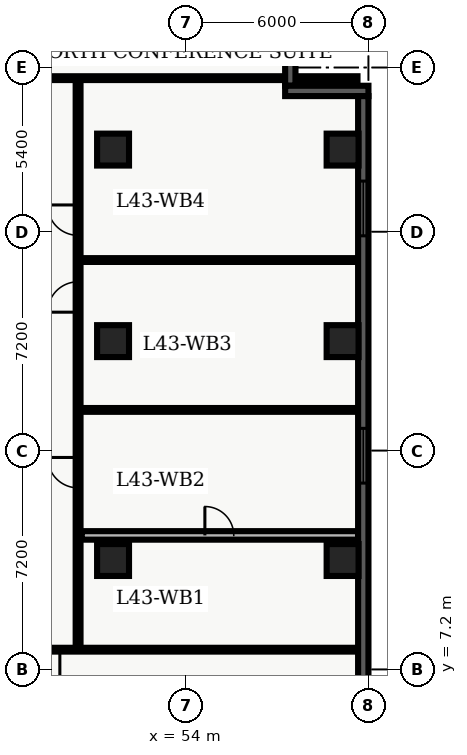
"""IFC4 building model, lengths in metres.
Left out: names, types, materials, properties, quantities, classifications, styles, units other than length and angle.
Written with IfcOpenShell. Run it as: python <this file> out.ifc"""

import sys

from ifc_helpers import new_model, entity, si_unit, converted_unit, direction, frame, origin_with_axes, origin_2d_with_axis, place, context, subcontext, project, spatial, polyline, rectangle, outline, extrude, element, fill, save


model = new_model("IFC4")
c1 = context("Model", 3, precision=1e-05, world=origin_with_axes(), true_north=direction((0.0, 1.0)))
c2 = subcontext(c1, "Body", "Model", "MODEL_VIEW")
j1 = project(units=[si_unit("LENGTHUNIT", "METRE"), converted_unit("PLANEANGLEUNIT", "DEGREE", entity("IfcPlaneAngleMeasure", 0.017), si_unit("PLANEANGLEUNIT", "RADIAN"), dimensions=[0, 0, 0, 0, 0, 0, 0])], contexts=[c1])
p1 = place(None, origin_with_axes())
s1 = spatial("IfcSite", under=j1, at=p1, CompositionType="ELEMENT")
p2 = place(p1, origin_with_axes())
s2 = spatial("IfcBuilding", under=s1, at=p2, CompositionType="ELEMENT")
p3 = place(p2, frame((0.0, 0.0, 175.8), z_axis=(0.0, 0.0, 1.0), x_axis=(1.0, 0.0, 0.0)))
s3 = spatial("IfcBuildingStorey", under=s2, at=p3, CompositionType="ELEMENT", Elevation=175.8)
for number, where, z_axis, x_axis in (
    (1, (51.6, 10.8, 0.0), (0.0, 0.0, 1.0), (1.0, 0.0, 0.0)),
    (2, (51.6, 18.0, 0.0), (0.0, 0.0, 1.0), (1.0, 0.0, 0.0)),
    (3, (51.6, 24.3, 0.0), (0.0, 0.0, 1.0), (1.0, 0.0, 0.0)),
    (4, (59.15, 10.8, 0.0), (0.0, 0.0, 1.0), (1.0, 0.0, 0.0)),
    (5, (59.15, 18.0, 0.0), (0.0, 0.0, 1.0), (1.0, 0.0, 0.0)),
    (6, (59.15, 24.3, 0.0), (0.0, 0.0, 1.0), (1.0, 0.0, 0.0)),
):
    element("IfcColumn", number, at=place(p3, frame(where, z_axis=z_axis, x_axis=x_axis)), inside=s3, PredefinedType="COLUMN", context=c2, shape_type="SweptSolid", body=[
        extrude(rectangle(XDim=1.05, YDim=1.05, at=origin_2d_with_axis()), origin_with_axes(), (0.0, 0.0, 1.0), 3.9),
    ])
p4 = place(p3, frame((50.45, 7.85, 0.0), z_axis=(0.0, 0.0, 1.0), x_axis=(0.0, 1.0, 0.0)))
e7 = element("IfcWall", 7, at=p4, inside=s3, PredefinedType="PARTITIONING", context=c2, shape_type="SweptSolid", body=[
    extrude(outline(polyline([(0.0, -0.08), (18.8, -0.08), (18.8, 0.08), (0.0, 0.08), (0.0, -0.08)])), origin_with_axes(), (0.0, 0.0, 1.0), 2.7),
])
p5 = place(p4, frame((5.823, 0.0, 0.0), z_axis=(0.0, 0.0, 1.0), x_axis=(1.0, 0.0, 0.0)))
e8 = element("IfcOpeningElement", 8, at=p5, cuts=e7, PredefinedType="OPENING", context=c2, shape_type="SweptSolid", body=[
    extrude(rectangle(XDim=1.0, YDim=0.18, at=origin_2d_with_axis()), origin_with_axes(), (0.0, 0.0, 1.0), 2.15),
])
p6 = place(p4, frame((11.602, 0.0, 0.0), z_axis=(0.0, 0.0, 1.0), x_axis=(1.0, 0.0, 0.0)))
e9 = element("IfcOpeningElement", 9, at=p6, cuts=e7, PredefinedType="OPENING", context=c2, shape_type="SweptSolid", body=[
    extrude(rectangle(XDim=1.0, YDim=0.18, at=origin_2d_with_axis()), origin_with_axes(), (0.0, 0.0, 1.0), 2.15),
])
p7 = place(p4, frame((14.129, 0.0, 0.0), z_axis=(0.0, 0.0, 1.0), x_axis=(1.0, 0.0, 0.0)))
e10 = element("IfcOpeningElement", 10, at=p7, cuts=e7, PredefinedType="OPENING", context=c2, shape_type="SweptSolid", body=[
    extrude(rectangle(XDim=1.0, YDim=0.18, at=origin_2d_with_axis()), origin_with_axes(), (0.0, 0.0, 1.0), 2.15),
])
p8 = place(p3, frame((59.665, 7.85, 0.0), z_axis=(0.0, 0.0, 1.0), x_axis=(-1.0, 0.0, 0.0)))
e11 = element("IfcWall", 11, at=p8, inside=s3, PredefinedType="PARTITIONING", context=c2, shape_type="SweptSolid", body=[
    extrude(outline(polyline([(0.0, -0.062), (11.615, -0.062), (11.615, 0.062), (0.0, 0.062), (0.0, -0.062)])), origin_with_axes(), (0.0, 0.0, 1.0), 2.7),
])
p9 = place(p8, frame((10.315, 0.0, 0.0), z_axis=(0.0, 0.0, 1.0), x_axis=(1.0, 0.0, 0.0)))
e12 = element("IfcOpeningElement", 12, at=p9, cuts=e11, PredefinedType="OPENING", context=c2, shape_type="SweptSolid", body=[
    extrude(rectangle(XDim=1.0, YDim=0.145, at=origin_2d_with_axis()), origin_with_axes(), (0.0, 0.0, 1.0), 2.15),
])
p10 = place(p3, frame((38.735, 26.65, 0.0), z_axis=(0.0, 0.0, 1.0), x_axis=(1.0, 0.0, 0.0)))
e13 = element("IfcWall", 13, at=p10, inside=s3, PredefinedType="PARTITIONING", context=c2, shape_type="SweptSolid", body=[
    extrude(outline(polyline([(0.0, -0.062), (20.905, -0.062), (20.905, 0.062), (0.0, 0.062), (0.0, -0.062)])), origin_with_axes(), (0.0, 0.0, 1.0), 2.7),
])
p11 = place(p10, frame((4.265, 0.0, 0.0), z_axis=(0.0, 0.0, 1.0), x_axis=(1.0, 0.0, 0.0)))
e14 = element("IfcOpeningElement", 14, at=p11, cuts=e13, PredefinedType="OPENING", context=c2, shape_type="SweptSolid", body=[
    extrude(rectangle(XDim=1.0, YDim=0.145, at=origin_2d_with_axis()), origin_with_axes(), (0.0, 0.0, 1.0), 2.15),
])
p12 = place(p3, frame((50.57, 11.609, 0.0), z_axis=(0.0, 0.0, 1.0), x_axis=(1.0, 0.0, 0.0)))
e15 = element("IfcWall", 15, at=p12, inside=s3, PredefinedType="PARTITIONING", context=c2, shape_type="SweptSolid", body=[
    extrude(outline(polyline([(0.0, -0.14), (9.095, -0.14), (9.095, 0.14), (0.0, 0.14), (0.0, -0.14)])), origin_with_axes(), (0.0, 0.0, 1.0), 2.7),
])
p13 = place(p12, frame((4.525, 0.0, 0.0), z_axis=(0.0, 0.0, 1.0), x_axis=(1.0, 0.0, 0.0)))
e16 = element("IfcOpeningElement", 16, at=p13, cuts=e15, PredefinedType="OPENING", context=c2, shape_type="SweptSolid", body=[
    extrude(rectangle(XDim=0.95, YDim=0.3, at=origin_2d_with_axis()), origin_with_axes(), (0.0, 0.0, 1.0), 2.15),
])
for number, where, z_axis, x_axis in (
    (17, (50.57, 15.737, 0.0), (0.0, 0.0, 1.0), (1.0, 0.0, 0.0)),
    (18, (50.57, 20.667, 0.0), (0.0, 0.0, 1.0), (1.0, 0.0, 0.0)),
):
    element("IfcWall", number, at=place(p3, frame(where, z_axis=z_axis, x_axis=x_axis)), inside=s3, PredefinedType="PARTITIONING", context=c2, shape_type="SweptSolid", body=[
        extrude(outline(polyline([(0.0, -0.062), (9.095, -0.062), (9.095, 0.062), (0.0, 0.062), (0.0, -0.062)])), origin_with_axes(), (0.0, 0.0, 1.0), 2.7),
    ])
p14 = place(p3, frame((57.43, 28.46, 0.0), z_axis=(0.0, 0.0, 1.0), x_axis=(0.0, -1.0, 0.0)))
e19 = element("IfcWall", 19, at=p14, inside=s3, PredefinedType="SOLIDWALL", context=c2, shape_type="SweptSolid", body=[
    extrude(outline(polyline([(0.0, -0.17), (2.06, -0.17), (2.06, 0.17), (0.0, 0.17), (0.0, -0.17)])), origin_with_axes(), (0.0, 0.0, 1.0), 3.66),
])
p15 = place(p3, frame((57.26, 26.23, 0.0), z_axis=(0.0, 0.0, 1.0), x_axis=(1.0, 0.0, 0.0)))
e20 = element("IfcWall", 20, at=p15, inside=s3, PredefinedType="SOLIDWALL", context=c2, shape_type="SweptSolid", body=[
    extrude(outline(polyline([(0.0, -0.17), (2.74, -0.17), (2.74, 0.17), (0.0, 0.17), (0.0, -0.17)])), origin_with_axes(), (0.0, 0.0, 1.0), 3.66),
])
p16 = place(p3, frame((59.83, 26.06, 0.0), z_axis=(0.0, 0.0, 1.0), x_axis=(0.0, -1.0, 0.0)))
e21 = element("IfcWall", 21, at=p16, inside=s3, PredefinedType="SOLIDWALL", context=c2, shape_type="SweptSolid", body=[
    extrude(outline(polyline([(0.0, -0.17), (23.66, -0.17), (23.66, 0.17), (0.0, 0.17), (0.0, -0.17)])), origin_with_axes(), (0.0, 0.0, 1.0), 3.66),
])
p17 = place(p16, frame((3.696, 0.0, 0.45), z_axis=(0.0, 0.0, 1.0), x_axis=(1.0, 0.0, 0.0)))
e22 = element("IfcOpeningElement", 22, at=p17, cuts=e21, PredefinedType="OPENING", context=c2, shape_type="SweptSolid", body=[
    extrude(rectangle(XDim=1.8, YDim=0.36, at=origin_2d_with_axis()), origin_with_axes(), (0.0, 0.0, 1.0), 2.1),
])
p18 = place(p16, frame((11.83, 0.0, 0.45), z_axis=(0.0, 0.0, 1.0), x_axis=(1.0, 0.0, 0.0)))
e23 = element("IfcOpeningElement", 23, at=p18, cuts=e21, PredefinedType="OPENING", context=c2, shape_type="SweptSolid", body=[
    extrude(rectangle(XDim=1.8, YDim=0.36, at=origin_2d_with_axis()), origin_with_axes(), (0.0, 0.0, 1.0), 2.1),
])
p19 = place(p16, frame((20.364, 0.0, 0.45), z_axis=(0.0, 0.0, 1.0), x_axis=(1.0, 0.0, 0.0)))
e24 = element("IfcOpeningElement", 24, at=p19, cuts=e21, PredefinedType="OPENING", context=c2, shape_type="SweptSolid", body=[
    extrude(rectangle(XDim=1.8, YDim=0.36, at=origin_2d_with_axis()), origin_with_axes(), (0.0, 0.0, 1.0), 2.1),
])
p20 = place(p8, frame((10.315, 0.0, 0.0), z_axis=(0.0, 0.0, 1.0), x_axis=(1.0, 0.0, 0.0)))
e25 = element("IfcDoor", 25, at=p20, inside=s3, OperationType="SINGLE_SWING_LEFT", PredefinedType="DOOR", context=c2, shape_type="SweptSolid", body=[
    extrude(rectangle(XDim=1.0, YDim=0.075, at=origin_2d_with_axis()), origin_with_axes(), (0.0, 0.0, 1.0), 2.15),
])
fill(e12, e25)
p21 = place(p12, frame((4.525, 0.0, 0.0), z_axis=(0.0, 0.0, 1.0), x_axis=(1.0, 0.0, 0.0)))
e26 = element("IfcDoor", 26, at=p21, inside=s3, OperationType="SINGLE_SWING_LEFT", PredefinedType="DOOR", context=c2, shape_type="SweptSolid", body=[
    extrude(rectangle(XDim=0.95, YDim=0.09, at=origin_2d_with_axis()), origin_with_axes(), (0.0, 0.0, 1.0), 2.15),
])
fill(e16, e26)
p22 = place(p4, frame((5.823, 0.0, 0.0), z_axis=(0.0, 0.0, 1.0), x_axis=(1.0, 0.0, 0.0)))
e27 = element("IfcDoor", 27, at=p22, inside=s3, OperationType="SINGLE_SWING_RIGHT", PredefinedType="DOOR", context=c2, shape_type="SweptSolid", body=[
    extrude(rectangle(XDim=1.0, YDim=0.09, at=origin_2d_with_axis()), origin_with_axes(), (0.0, 0.0, 1.0), 2.15),
])
fill(e8, e27)
p23 = place(p4, frame((11.602, 0.0, 0.0), z_axis=(0.0, 0.0, 1.0), x_axis=(1.0, 0.0, 0.0)))
e28 = element("IfcDoor", 28, at=p23, inside=s3, OperationType="SINGLE_SWING_LEFT", PredefinedType="DOOR", context=c2, shape_type="SweptSolid", body=[
    extrude(rectangle(XDim=1.0, YDim=0.09, at=origin_2d_with_axis()), origin_with_axes(), (0.0, 0.0, 1.0), 2.15),
])
fill(e9, e28)
p24 = place(p4, frame((14.129, 0.0, 0.0), z_axis=(0.0, 0.0, 1.0), x_axis=(1.0, 0.0, 0.0)))
e29 = element("IfcDoor", 29, at=p24, inside=s3, OperationType="SINGLE_SWING_RIGHT", PredefinedType="DOOR", context=c2, shape_type="SweptSolid", body=[
    extrude(rectangle(XDim=1.0, YDim=0.09, at=origin_2d_with_axis()), origin_with_axes(), (0.0, 0.0, 1.0), 2.15),
])
fill(e10, e29)
p25 = place(p16, frame((3.696, 0.0, 0.45), z_axis=(0.0, 0.0, 1.0), x_axis=(1.0, 0.0, 0.0)))
e30 = element("IfcWindow", 30, at=p25, inside=s3, PredefinedType="WINDOW", context=c2, shape_type="SweptSolid", body=[
    extrude(rectangle(XDim=1.8, YDim=0.09, at=origin_2d_with_axis()), origin_with_axes(), (0.0, 0.0, 1.0), 2.1),
])
fill(e22, e30)
p26 = place(p16, frame((11.83, 0.0, 0.45), z_axis=(0.0, 0.0, 1.0), x_axis=(1.0, 0.0, 0.0)))
e31 = element("IfcWindow", 31, at=p26, inside=s3, PredefinedType="WINDOW", context=c2, shape_type="SweptSolid", body=[
    extrude(rectangle(XDim=1.8, YDim=0.09, at=origin_2d_with_axis()), origin_with_axes(), (0.0, 0.0, 1.0), 2.1),
])
fill(e23, e31)
save(model, sys.argv[1])
